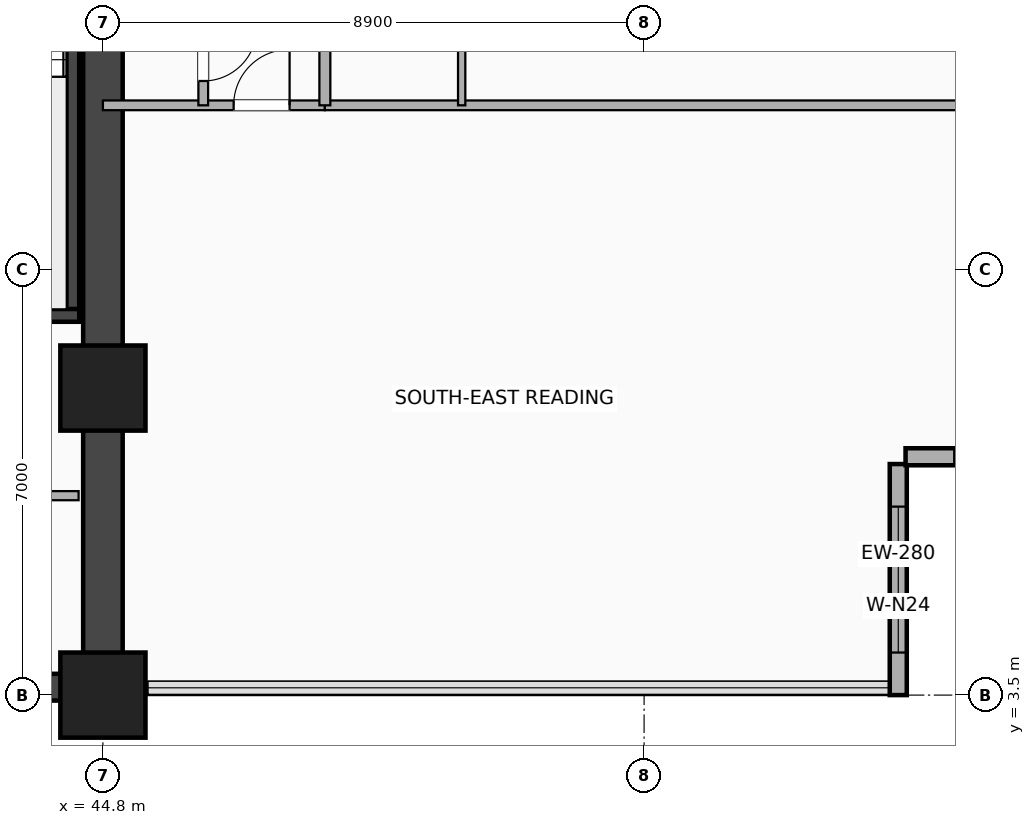
"""IFC4 building model, lengths in metres.
Left out: names, types, materials, properties, quantities, classifications, styles, units other than length and angle.
Written with IfcOpenShell. Run it as: python <this file> out.ifc"""

import sys

from ifc_helpers import new_model, si_unit, direction, frame, frame_2d, origin, origin_2d, place, context, subcontext, project, spatial, rectangle, extrude, element, fill, save


model = new_model("IFC4")
c1 = context("Model", 3, precision=1e-05, world=origin(), true_north=direction((0.0, 1.0)))
c2 = subcontext(c1, "Body", "Model", "MODEL_VIEW")
j1 = project(units=[si_unit("LENGTHUNIT", "METRE"), si_unit("PLANEANGLEUNIT", "RADIAN")], contexts=[c1])
p1 = place(None, origin())
s1 = spatial("IfcSite", under=j1, at=p1, CompositionType="ELEMENT")
p2 = place(p1, origin())
s2 = spatial("IfcBuilding", under=s1, at=p2, CompositionType="ELEMENT")
p3 = place(p2, frame((0.0, 0.0, 68.4)))
s3 = spatial("IfcBuildingStorey", under=s2, at=p3, CompositionType="ELEMENT", Elevation=68.4)
p4 = place(p3, frame((20.3, 3.63, 0.0), z_axis=(0.0, 0.0, 1.0), x_axis=(1.0, 0.0, 0.0)))
e1 = element("IfcWall", 1, at=p4, inside=s3, PredefinedType="SHEAR", context=c2, shape_type="SweptSolid", body=[
    extrude(rectangle(XDim=24.5, YDim=0.44, at=frame_2d((12.25, 0.0))), origin(), (0.0, 0.0, 1.0), 3.22),
])
p5 = place(p3, frame((44.8, 3.5, 0.0), z_axis=(0.0, 0.0, 1.0), x_axis=(0.0, 1.0, 0.0)))
e2 = element("IfcWall", 2, at=p5, inside=s3, PredefinedType="SHEAR", context=c2, shape_type="SweptSolid", body=[
    extrude(rectangle(XDim=16.9, YDim=0.65, at=frame_2d((8.45, 0.0))), origin(), (0.0, 0.0, 1.0), 3.22),
])
p6 = place(p3, frame((44.305, 9.745, 0.0), z_axis=(0.0, 0.0, 1.0), x_axis=(0.0, 1.0, 0.0)))
e3 = element("IfcWall", 3, at=p6, inside=s3, PredefinedType="SHEAR", context=c2, shape_type="SweptSolid", body=[
    extrude(rectangle(XDim=8.01, YDim=0.21, at=frame_2d((4.005, 0.0))), origin(), (0.0, 0.0, 1.0), 3.22),
])
p7 = place(p3, frame((40.75, 9.745, 0.0), z_axis=(0.0, 0.0, 1.0), x_axis=(1.0, 0.0, 0.0)))
e4 = element("IfcWall", 4, at=p7, inside=s3, PredefinedType="SHEAR", context=c2, shape_type="SweptSolid", body=[
    extrude(rectangle(XDim=3.66, YDim=0.21, at=frame_2d((1.83, 0.0))), origin(), (0.0, 0.0, 1.0), 3.22),
])
for number, where, z_axis, x_axis in (
    (5, (44.8, 3.5, -0.28), (0.0, 0.0, 1.0), (1.0, 0.0, 0.0)),
    (6, (44.8, 8.55, -0.28), (0.0, 0.0, 1.0), (1.0, 0.0, 0.0)),
):
    element("IfcColumn", number, at=place(p3, frame(where, z_axis=z_axis, x_axis=x_axis)), inside=s3, PredefinedType="COLUMN", context=c2, shape_type="SweptSolid", body=[
        extrude(rectangle(XDim=1.4, YDim=1.4, at=origin_2d()), origin(), (0.0, 0.0, 1.0), 3.5),
    ])
p8 = place(p3, frame((57.88, 3.5, 0.0), z_axis=(0.0, 0.0, 1.0), x_axis=(0.0, 1.0, 0.0)))
e7 = element("IfcWall", 7, at=p8, inside=s3, PredefinedType="SOLIDWALL", context=c2, shape_type="SweptSolid", body=[
    extrude(rectangle(XDim=3.8, YDim=0.28, at=frame_2d((1.9, 0.0))), origin(), (0.0, 0.0, 1.0), 3.22),
])
p9 = place(p8, frame((0.7, 0.0, 0.85)))
e8 = element("IfcOpeningElement", 8, at=p9, cuts=e7, PredefinedType="OPENING", context=c2, shape_type="SweptSolid", body=[
    extrude(rectangle(XDim=2.4, YDim=1.65, at=frame_2d((1.2, 0.825))), frame((0.0, 0.15, 0.0), z_axis=(0.0, -1.0, 0.0), x_axis=(1.0, 0.0, 0.0)), (0.0, 0.0, 1.0), 0.3),
])
p10 = place(p3, frame((58.0, 7.42, 0.0), z_axis=(0.0, 0.0, 1.0), x_axis=(1.0, 0.0, 0.0)))
e9 = element("IfcWall", 9, at=p10, inside=s3, PredefinedType="SOLIDWALL", context=c2, shape_type="SweptSolid", body=[
    extrude(rectangle(XDim=3.8, YDim=0.28, at=frame_2d((1.9, 0.0))), origin(), (0.0, 0.0, 1.0), 3.22),
])
p11 = place(p10, frame((0.8, 0.0, 0.85)))
e10 = element("IfcOpeningElement", 10, at=p11, cuts=e9, PredefinedType="OPENING", context=c2, shape_type="SweptSolid", body=[
    extrude(rectangle(XDim=2.2, YDim=1.65, at=frame_2d((1.1, 0.825))), frame((0.0, 0.15, 0.0), z_axis=(0.0, -1.0, 0.0), x_axis=(1.0, 0.0, 0.0)), (0.0, 0.0, 1.0), 0.3),
])
p12 = place(p3, frame((41.74, 6.78, 0.0), z_axis=(0.0, 0.0, 1.0), x_axis=(1.0, 0.0, 0.0)))
e11 = element("IfcWall", 11, at=p12, inside=s3, PredefinedType="PARTITIONING", context=c2, shape_type="SweptSolid", body=[
    extrude(rectangle(XDim=2.66, YDim=0.15, at=frame_2d((1.33, 0.0))), origin(), (0.0, 0.0, 1.0), 2.51),
])
p13 = place(p3, frame((44.8, 13.2, 0.0), z_axis=(0.0, 0.0, 1.0), x_axis=(1.0, 0.0, 0.0)))
e12 = element("IfcWall", 12, at=p13, inside=s3, PredefinedType="PARTITIONING", context=c2, shape_type="SweptSolid", body=[
    extrude(rectangle(XDim=3.65, YDim=0.16, at=frame_2d((1.825, 0.0))), origin(), (0.0, 0.0, 1.0), 2.51),
])
p14 = place(p13, frame((3.07, 0.0, 0.0), z_axis=(0.0, 0.0, 1.0), x_axis=(-1.0, 0.0, 0.0)))
e13 = element("IfcOpeningElement", 13, at=p14, cuts=e12, PredefinedType="OPENING", context=c2, shape_type="SweptSolid", body=[
    extrude(rectangle(XDim=0.92, YDim=2.08, at=frame_2d((0.46, 1.04))), frame((0.0, 0.09, 0.0), z_axis=(0.0, -1.0, 0.0), x_axis=(1.0, 0.0, 0.0)), (0.0, 0.0, 1.0), 0.18),
])
p15 = place(p3, frame((46.45, 13.2, 0.0), z_axis=(0.0, 0.0, 1.0), x_axis=(0.0, 1.0, 0.0)))
e14 = element("IfcWall", 14, at=p15, inside=s3, PredefinedType="PARTITIONING", context=c2, shape_type="SweptSolid", body=[
    extrude(rectangle(XDim=7.22, YDim=0.16, at=frame_2d((3.61, 0.0))), origin(), (0.0, 0.0, 1.0), 2.51),
])
p16 = place(p15, frame((0.4, 0.0, 0.0)))
e15 = element("IfcOpeningElement", 15, at=p16, cuts=e14, PredefinedType="OPENING", context=c2, shape_type="SweptSolid", body=[
    extrude(rectangle(XDim=0.88, YDim=2.08, at=frame_2d((0.44, 1.04))), frame((0.0, 0.09, 0.0), z_axis=(0.0, -1.0, 0.0), x_axis=(1.0, 0.0, 0.0)), (0.0, 0.0, 1.0), 0.18),
])
p17 = place(p3, frame((48.45, 13.2, 0.0), z_axis=(0.0, 0.0, 1.0), x_axis=(1.0, 0.0, 0.0)))
e16 = element("IfcWall", 16, at=p17, inside=s3, PredefinedType="PARTITIONING", context=c2, shape_type="SweptSolid", body=[
    extrude(rectangle(XDim=13.23, YDim=0.16, at=frame_2d((6.615, 0.0))), origin(), (0.0, 0.0, 1.0), 2.583),
])
p18 = place(p3, frame((50.7, 13.2, 0.0), z_axis=(0.0, 0.0, 1.0), x_axis=(0.0, 1.0, 0.0)))
e17 = element("IfcWall", 17, at=p18, inside=s3, PredefinedType="PARTITIONING", context=c2, shape_type="SweptSolid", body=[
    extrude(rectangle(XDim=2.15, YDim=0.12, at=frame_2d((1.075, 0.0))), origin(), (0.0, 0.0, 1.0), 2.902),
])
p19 = place(p3, frame((48.45, 13.2, 0.0), z_axis=(0.0, 0.0, 1.0), x_axis=(0.0, 1.0, 0.0)))
e18 = element("IfcWall", 18, at=p19, inside=s3, PredefinedType="PARTITIONING", context=c2, shape_type="SweptSolid", body=[
    extrude(rectangle(XDim=2.15, YDim=0.18, at=frame_2d((1.075, 0.0))), origin(), (0.0, 0.0, 1.0), 2.902),
])
p20 = place(p9, origin())
e19 = element("IfcWindow", 19, at=p20, inside=s3, PartitioningType="SINGLE_PANEL", PredefinedType="WINDOW", context=c2, shape_type="SweptSolid", body=[
    extrude(rectangle(XDim=2.4, YDim=1.65, at=frame_2d((1.2, 0.825))), frame((0.0, 0.03, 0.0), z_axis=(0.0, -1.0, 0.0), x_axis=(1.0, 0.0, 0.0)), (0.0, 0.0, 1.0), 0.06),
])
fill(e8, e19)
p21 = place(p11, origin())
e20 = element("IfcWindow", 20, at=p21, inside=s3, PartitioningType="SINGLE_PANEL", PredefinedType="WINDOW", context=c2, shape_type="SweptSolid", body=[
    extrude(rectangle(XDim=2.2, YDim=1.65, at=frame_2d((1.1, 0.825))), frame((0.0, 0.03, 0.0), z_axis=(0.0, -1.0, 0.0), x_axis=(1.0, 0.0, 0.0)), (0.0, 0.0, 1.0), 0.06),
])
fill(e10, e20)
p22 = place(p14, origin())
e21 = element("IfcDoor", 21, at=p22, inside=s3, OperationType="SINGLE_SWING_RIGHT", PredefinedType="DOOR", context=c2, shape_type="SweptSolid", body=[
    extrude(rectangle(XDim=0.92, YDim=2.08, at=frame_2d((0.46, 1.04))), frame((0.0, 0.025, 0.0), z_axis=(0.0, -1.0, 0.0), x_axis=(1.0, 0.0, 0.0)), (0.0, 0.0, 1.0), 0.05),
])
fill(e13, e21)
p23 = place(p16, origin())
e22 = element("IfcDoor", 22, at=p23, inside=s3, OperationType="SINGLE_SWING_RIGHT", PredefinedType="DOOR", context=c2, shape_type="SweptSolid", body=[
    extrude(rectangle(XDim=0.88, YDim=2.08, at=frame_2d((0.44, 1.04))), frame((0.0, 0.025, 0.0), z_axis=(0.0, -1.0, 0.0), x_axis=(1.0, 0.0, 0.0)), (0.0, 0.0, 1.0), 0.05),
])
fill(e15, e22)
save(model, sys.argv[1])
